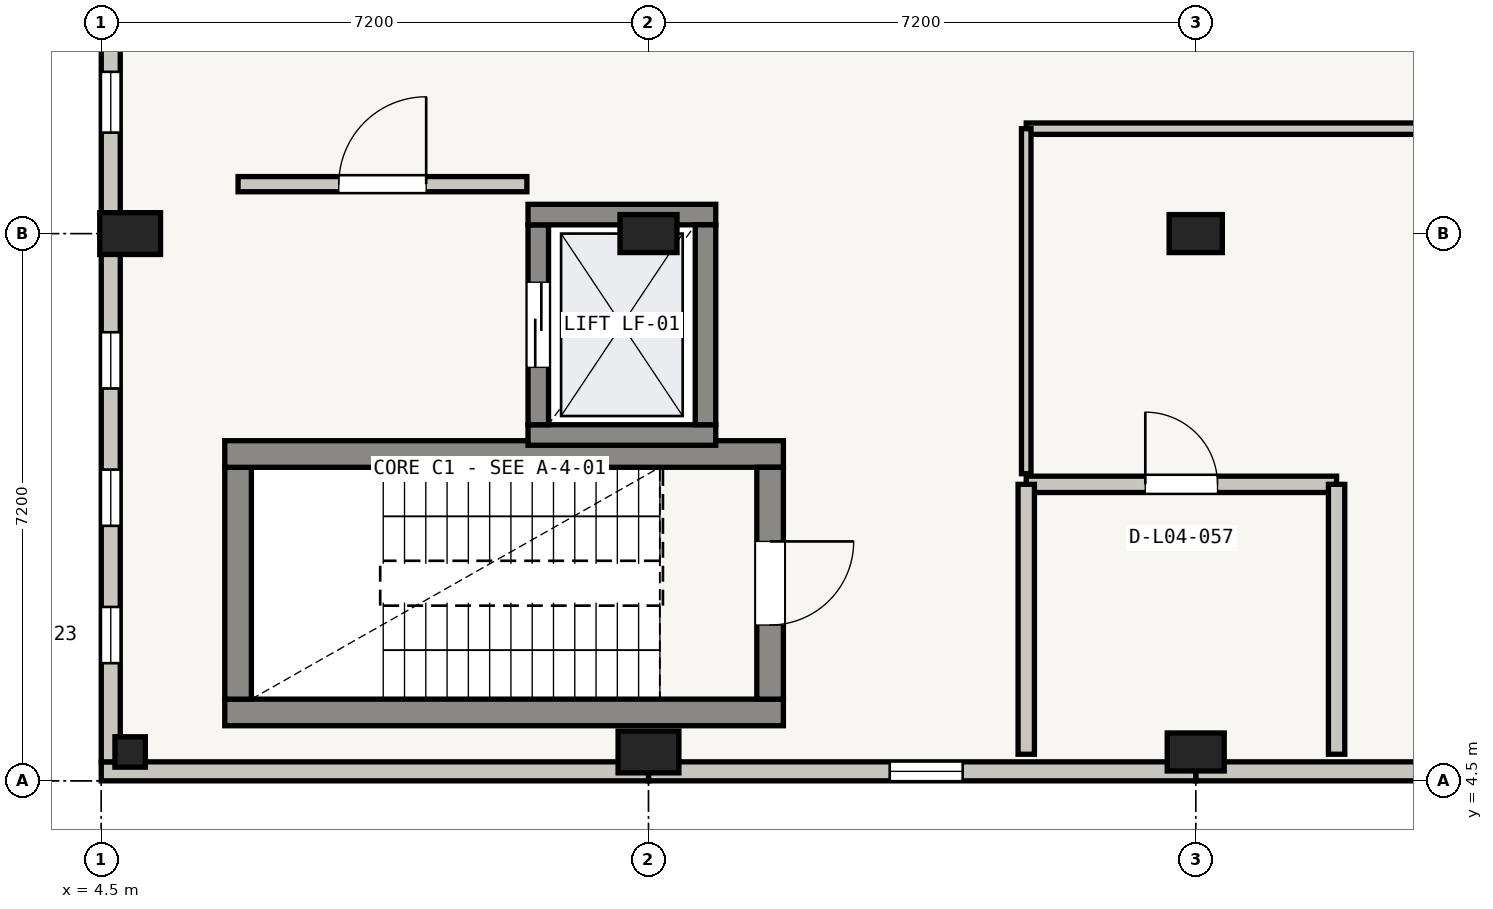
"""IFC4 building model, lengths in metres.
Left out: names, types, materials, properties, quantities, classifications, styles, units other than length and angle.
Written with IfcOpenShell. Run it as: python <this file> out.ifc"""

import sys

from ifc_helpers import new_model, si_unit, direction, frame, frame_2d, origin, origin_2d, place, context, subcontext, project, spatial, rectangle, extrude, element, fill, save


model = new_model("IFC4")
c1 = context("Model", 3, precision=1e-05, world=origin(), true_north=direction((0.0, 1.0)))
c2 = subcontext(c1, "Body", "Model", "MODEL_VIEW")
j1 = project(units=[si_unit("LENGTHUNIT", "METRE"), si_unit("PLANEANGLEUNIT", "RADIAN")], contexts=[c1])
p1 = place(None, origin())
s1 = spatial("IfcSite", under=j1, at=p1, CompositionType="ELEMENT")
p2 = place(p1, origin())
s2 = spatial("IfcBuilding", under=s1, at=p2, CompositionType="ELEMENT")
p3 = place(p2, frame((0.0, 0.0, 17.1)))
s3 = spatial("IfcBuildingStorey", under=s2, at=p3, CompositionType="ELEMENT", Elevation=17.1)
p4 = place(p3, frame((4.88, 4.88, 0.0), z_axis=(0.0, 0.0, 1.0), x_axis=(1.0, 0.0, 0.0)))
e1 = element("IfcColumn", 1, at=p4, inside=s3, PredefinedType="COLUMN", context=c2, shape_type="SweptSolid", body=[
    extrude(rectangle(XDim=0.4, YDim=0.4, at=origin_2d()), origin(), (0.0, 0.0, 1.0), 3.77),
])
for number, where, z_axis, x_axis in (
    (2, (4.88, 11.7, 0.0), (0.0, 0.0, 1.0), (1.0, 0.0, 0.0)),
    (3, (11.7, 4.88, 0.0), (0.0, 0.0, 1.0), (1.0, 0.0, 0.0)),
):
    element("IfcColumn", number, at=place(p3, frame(where, z_axis=z_axis, x_axis=x_axis)), inside=s3, PredefinedType="COLUMN", context=c2, shape_type="SweptSolid", body=[
        extrude(rectangle(XDim=0.8, YDim=0.55, at=origin_2d()), origin(), (0.0, 0.0, 1.0), 3.77),
    ])
for number, where, z_axis, x_axis in (
    (4, (11.7, 11.7, 0.0), (0.0, 0.0, 1.0), (1.0, 0.0, 0.0)),
    (5, (18.9, 4.88, 0.0), (0.0, 0.0, 1.0), (1.0, 0.0, 0.0)),
):
    element("IfcColumn", number, at=place(p3, frame(where, z_axis=z_axis, x_axis=x_axis)), inside=s3, PredefinedType="COLUMN", context=c2, shape_type="SweptSolid", body=[
        extrude(rectangle(XDim=0.75, YDim=0.5, at=origin_2d()), origin(), (0.0, 0.0, 1.0), 3.77),
    ])
p5 = place(p3, frame((18.9, 11.7, 0.0), z_axis=(0.0, 0.0, 1.0), x_axis=(1.0, 0.0, 0.0)))
e6 = element("IfcColumn", 6, at=p5, inside=s3, PredefinedType="COLUMN", context=c2, shape_type="SweptSolid", body=[
    extrude(rectangle(XDim=0.7, YDim=0.5, at=origin_2d()), origin(), (0.0, 0.0, 1.0), 3.77),
])
p6 = place(p3, frame((26.1, 4.625, 0.0), z_axis=(0.0, 0.0, 1.0), x_axis=(-1.0, 0.0, 0.0)))
e7 = element("IfcWall", 7, at=p6, inside=s3, PredefinedType="STANDARD", context=c2, shape_type="SweptSolid", body=[
    extrude(rectangle(XDim=7.2, YDim=0.25, at=frame_2d((3.6, 0.0))), origin(), (0.0, 0.0, 1.0), 2.805),
])
p7 = place(p6, frame((1.288, 0.0, 0.6)))
e8 = element("IfcOpeningElement", 8, at=p7, cuts=e7, PredefinedType="OPENING", context=c2, shape_type="SweptSolid", body=[
    extrude(rectangle(XDim=0.88, YDim=1.8, at=frame_2d((0.44, 0.9))), frame((0.0, 0.125, 0.0), z_axis=(0.0, -1.0, 0.0), x_axis=(1.0, 0.0, 0.0)), (0.0, 0.0, 1.0), 0.25),
])
p8 = place(p6, frame((3.16, 0.0, 0.6)))
e9 = element("IfcOpeningElement", 9, at=p8, cuts=e7, PredefinedType="OPENING", context=c2, shape_type="SweptSolid", body=[
    extrude(rectangle(XDim=0.88, YDim=1.8, at=frame_2d((0.44, 0.9))), frame((0.0, 0.125, 0.0), z_axis=(0.0, -1.0, 0.0), x_axis=(1.0, 0.0, 0.0)), (0.0, 0.0, 1.0), 0.25),
])
p9 = place(p3, frame((18.9, 4.625, 0.0), z_axis=(0.0, 0.0, 1.0), x_axis=(-1.0, 0.0, 0.0)))
e10 = element("IfcWall", 10, at=p9, inside=s3, PredefinedType="STANDARD", context=c2, shape_type="SweptSolid", body=[
    extrude(rectangle(XDim=7.2, YDim=0.25, at=frame_2d((3.6, 0.0))), origin(), (0.0, 0.0, 1.0), 3.155),
])
p10 = place(p9, frame((3.066, 0.0, 0.55)))
e11 = element("IfcOpeningElement", 11, at=p10, cuts=e10, PredefinedType="OPENING", context=c2, shape_type="SweptSolid", body=[
    extrude(rectangle(XDim=0.96, YDim=2.1, at=frame_2d((0.48, 1.05))), frame((0.0, 0.125, 0.0), z_axis=(0.0, -1.0, 0.0), x_axis=(1.0, 0.0, 0.0)), (0.0, 0.0, 1.0), 0.25),
])
p11 = place(p3, frame((11.7, 4.625, 0.0), z_axis=(0.0, 0.0, 1.0), x_axis=(-1.0, 0.0, 0.0)))
e12 = element("IfcWall", 12, at=p11, inside=s3, PredefinedType="STANDARD", context=c2, shape_type="SweptSolid", body=[
    extrude(rectangle(XDim=7.2, YDim=0.25, at=frame_2d((3.6, 0.0))), origin(), (0.0, 0.0, 1.0), 3.175),
])
p12 = place(p3, frame((4.625, 4.75, 0.0), z_axis=(0.0, 0.0, 1.0), x_axis=(0.0, 1.0, 0.0)))
e13 = element("IfcWall", 13, at=p12, inside=s3, PredefinedType="STANDARD", context=c2, shape_type="SweptSolid", body=[
    extrude(rectangle(XDim=6.95, YDim=0.25, at=frame_2d((3.475, 0.0))), origin(), (0.0, 0.0, 1.0), 3.175),
])
p13 = place(p12, frame((1.298, 0.0, 0.55)))
e14 = element("IfcOpeningElement", 14, at=p13, cuts=e13, PredefinedType="OPENING", context=c2, shape_type="SweptSolid", body=[
    extrude(rectangle(XDim=0.74, YDim=2.04, at=frame_2d((0.37, 1.02))), frame((0.0, 0.125, 0.0), z_axis=(0.0, -1.0, 0.0), x_axis=(1.0, 0.0, 0.0)), (0.0, 0.0, 1.0), 0.25),
])
p14 = place(p12, frame((3.105, 0.0, 0.55)))
e15 = element("IfcOpeningElement", 15, at=p14, cuts=e13, PredefinedType="OPENING", context=c2, shape_type="SweptSolid", body=[
    extrude(rectangle(XDim=0.74, YDim=2.04, at=frame_2d((0.37, 1.02))), frame((0.0, 0.125, 0.0), z_axis=(0.0, -1.0, 0.0), x_axis=(1.0, 0.0, 0.0)), (0.0, 0.0, 1.0), 0.25),
])
p15 = place(p12, frame((4.912, 0.0, 0.55)))
e16 = element("IfcOpeningElement", 16, at=p15, cuts=e13, PredefinedType="OPENING", context=c2, shape_type="SweptSolid", body=[
    extrude(rectangle(XDim=0.74, YDim=2.04, at=frame_2d((0.37, 1.02))), frame((0.0, 0.125, 0.0), z_axis=(0.0, -1.0, 0.0), x_axis=(1.0, 0.0, 0.0)), (0.0, 0.0, 1.0), 0.25),
])
p16 = place(p3, frame((4.625, 11.7, 0.0), z_axis=(0.0, 0.0, 1.0), x_axis=(0.0, 1.0, 0.0)))
e17 = element("IfcWall", 17, at=p16, inside=s3, PredefinedType="STANDARD", context=c2, shape_type="SweptSolid", body=[
    extrude(rectangle(XDim=7.2, YDim=0.25, at=frame_2d((3.6, 0.0))), origin(), (0.0, 0.0, 1.0), 3.175),
])
p17 = place(p16, frame((1.328, 0.0, 0.55)))
e18 = element("IfcOpeningElement", 18, at=p17, cuts=e17, PredefinedType="OPENING", context=c2, shape_type="SweptSolid", body=[
    extrude(rectangle(XDim=0.8, YDim=2.04, at=frame_2d((0.4, 1.02))), frame((0.0, 0.125, 0.0), z_axis=(0.0, -1.0, 0.0), x_axis=(1.0, 0.0, 0.0)), (0.0, 0.0, 1.0), 0.25),
])
p18 = place(p16, frame((2.45, 0.0, 0.55)))
e19 = element("IfcOpeningElement", 19, at=p18, cuts=e17, PredefinedType="OPENING", context=c2, shape_type="SweptSolid", body=[
    extrude(rectangle(XDim=0.8, YDim=2.04, at=frame_2d((0.4, 1.02))), frame((0.0, 0.125, 0.0), z_axis=(0.0, -1.0, 0.0), x_axis=(1.0, 0.0, 0.0)), (0.0, 0.0, 1.0), 0.25),
])
p19 = place(p3, frame((13.475, 5.4, 0.0), z_axis=(0.0, 0.0, 1.0), x_axis=(-1.0, 0.0, 0.0)))
e20 = element("IfcWall", 20, at=p19, inside=s3, PredefinedType="SHEAR", context=c2, shape_type="SweptSolid", body=[
    extrude(rectangle(XDim=7.35, YDim=0.35, at=frame_2d((3.675, 0.0))), origin(), (0.0, 0.0, 1.0), 3.77),
])
p20 = place(p3, frame((6.3, 5.575, 0.0), z_axis=(0.0, 0.0, 1.0), x_axis=(0.0, 1.0, 0.0)))
e21 = element("IfcWall", 21, at=p20, inside=s3, PredefinedType="SHEAR", context=c2, shape_type="SweptSolid", body=[
    extrude(rectangle(XDim=3.05, YDim=0.35, at=frame_2d((1.525, 0.0))), origin(), (0.0, 0.0, 1.0), 3.77),
])
p21 = place(p3, frame((6.125, 8.8, 0.0), z_axis=(0.0, 0.0, 1.0), x_axis=(1.0, 0.0, 0.0)))
e22 = element("IfcWall", 22, at=p21, inside=s3, PredefinedType="SHEAR", context=c2, shape_type="SweptSolid", body=[
    extrude(rectangle(XDim=7.35, YDim=0.35, at=frame_2d((3.675, 0.0))), origin(), (0.0, 0.0, 1.0), 3.77),
])
p22 = place(p3, frame((13.3, 8.625, 0.0), z_axis=(0.0, 0.0, 1.0), x_axis=(0.0, -1.0, 0.0)))
e23 = element("IfcWall", 23, at=p22, inside=s3, PredefinedType="SHEAR", context=c2, shape_type="SweptSolid", body=[
    extrude(rectangle(XDim=3.05, YDim=0.35, at=frame_2d((1.525, 0.0))), origin(), (0.0, 0.0, 1.0), 3.77),
])
p23 = place(p22, frame((0.975, 0.0, 0.0)))
e24 = element("IfcOpeningElement", 24, at=p23, cuts=e23, PredefinedType="OPENING", context=c2, shape_type="SweptSolid", body=[
    extrude(rectangle(XDim=1.1, YDim=2.05, at=frame_2d((0.55, 1.025))), frame((0.0, 0.175, 0.0), z_axis=(0.0, -1.0, 0.0), x_axis=(1.0, 0.0, 0.0)), (0.0, 0.0, 1.0), 0.35),
])
p24 = place(p3, frame((12.585, 9.05, 0.0), z_axis=(0.0, 0.0, 1.0), x_axis=(-1.0, 0.0, 0.0)))
e25 = element("IfcWall", 25, at=p24, inside=s3, PredefinedType="SHEAR", context=c2, shape_type="SweptSolid", body=[
    extrude(rectangle(XDim=2.47, YDim=0.27, at=frame_2d((1.235, 0.0))), origin(), (0.0, 0.0, 1.0), 3.77),
])
p25 = place(p3, frame((10.25, 9.185, 0.0), z_axis=(0.0, 0.0, 1.0), x_axis=(0.0, 1.0, 0.0)))
e26 = element("IfcWall", 26, at=p25, inside=s3, PredefinedType="SHEAR", context=c2, shape_type="SweptSolid", body=[
    extrude(rectangle(XDim=2.63, YDim=0.27, at=frame_2d((1.315, 0.0))), origin(), (0.0, 0.0, 1.0), 3.77),
])
p26 = place(p25, frame((0.755, 0.0, 0.0)))
e27 = element("IfcOpeningElement", 27, at=p26, cuts=e26, PredefinedType="OPENING", context=c2, shape_type="SweptSolid", body=[
    extrude(rectangle(XDim=1.12, YDim=2.1, at=frame_2d((0.56, 1.05))), frame((0.0, 0.135, 0.0), z_axis=(0.0, -1.0, 0.0), x_axis=(1.0, 0.0, 0.0)), (0.0, 0.0, 1.0), 0.27),
])
p27 = place(p3, frame((10.115, 11.95, 0.0), z_axis=(0.0, 0.0, 1.0), x_axis=(1.0, 0.0, 0.0)))
e28 = element("IfcWall", 28, at=p27, inside=s3, PredefinedType="SHEAR", context=c2, shape_type="SweptSolid", body=[
    extrude(rectangle(XDim=2.47, YDim=0.27, at=frame_2d((1.235, 0.0))), origin(), (0.0, 0.0, 1.0), 3.77),
])
p28 = place(p3, frame((12.45, 11.815, 0.0), z_axis=(0.0, 0.0, 1.0), x_axis=(0.0, -1.0, 0.0)))
e29 = element("IfcWall", 29, at=p28, inside=s3, PredefinedType="SHEAR", context=c2, shape_type="SweptSolid", body=[
    extrude(rectangle(XDim=2.63, YDim=0.27, at=frame_2d((1.315, 0.0))), origin(), (0.0, 0.0, 1.0), 3.77),
])
p29 = place(p3, frame((6.3, 12.35, 0.0), z_axis=(0.0, 0.0, 1.0), x_axis=(1.0, 0.0, 0.0)))
e30 = element("IfcWall", 30, at=p29, inside=s3, PredefinedType="SOLIDWALL", context=c2, shape_type="SweptSolid", body=[
    extrude(rectangle(XDim=3.8, YDim=0.2, at=frame_2d((1.9, 0.0))), origin(), (0.0, 0.0, 1.0), 2.79),
])
p30 = place(p29, frame((1.325, 0.0, 0.0)))
e31 = element("IfcOpeningElement", 31, at=p30, cuts=e30, PredefinedType="OPENING", context=c2, shape_type="SweptSolid", body=[
    extrude(rectangle(XDim=1.15, YDim=2.05, at=frame_2d((0.575, 1.025))), frame((0.0, 0.1, 0.0), z_axis=(0.0, -1.0, 0.0), x_axis=(1.0, 0.0, 0.0)), (0.0, 0.0, 1.0), 0.2),
])
p31 = place(p3, frame((16.67, 8.401, 0.0), z_axis=(0.0, 0.0, 1.0), x_axis=(1.0, 0.0, 0.0)))
e32 = element("IfcWall", 32, at=p31, inside=s3, PredefinedType="PLUMBINGWALL", context=c2, shape_type="SweptSolid", body=[
    extrude(rectangle(XDim=4.083, YDim=0.215, at=frame_2d((2.042, 0.0))), origin(), (0.0, 0.0, 1.0), 2.79),
])
p32 = place(p31, frame((1.567, 0.0, 0.0)))
e33 = element("IfcOpeningElement", 33, at=p32, cuts=e32, PredefinedType="OPENING", context=c2, shape_type="SweptSolid", body=[
    extrude(rectangle(XDim=0.95, YDim=2.05, at=frame_2d((0.475, 1.025))), frame((0.0, 0.107, 0.0), z_axis=(0.0, -1.0, 0.0), x_axis=(1.0, 0.0, 0.0)), (0.0, 0.0, 1.0), 0.215),
])
for number, where, z_axis, x_axis in (
    (34, (16.67, 4.85, 0.0), (0.0, 0.0, 1.0), (0.0, 1.0, 0.0)),
    (35, (20.753, 8.401, 0.0), (0.0, 0.0, 1.0), (0.0, -1.0, 0.0)),
):
    element("IfcWall", number, at=place(p3, frame(where, z_axis=z_axis, x_axis=x_axis)), inside=s3, PredefinedType="PLUMBINGWALL", context=c2, shape_type="SweptSolid", body=[
        extrude(rectangle(XDim=3.551, YDim=0.215, at=frame_2d((1.775, 0.0))), origin(), (0.0, 0.0, 1.0), 2.79),
    ])
p33 = place(p3, frame((16.67, 13.08, 0.0), z_axis=(0.0, 0.0, 1.0), x_axis=(1.0, 0.0, 0.0)))
e36 = element("IfcWall", 36, at=p33, inside=s3, PredefinedType="PARTITIONING", context=c2, shape_type="SweptSolid", body=[
    extrude(rectangle(XDim=16.38, YDim=0.15, at=frame_2d((8.19, 0.0))), origin(), (0.0, 0.0, 1.0), 2.79),
])
p34 = place(p33, frame((7.69, 0.0, 0.0)))
e37 = element("IfcOpeningElement", 37, at=p34, cuts=e36, PredefinedType="OPENING", context=c2, shape_type="SweptSolid", body=[
    extrude(rectangle(XDim=1.0, YDim=2.05, at=frame_2d((0.5, 1.025))), frame((0.0, 0.075, 0.0), z_axis=(0.0, -1.0, 0.0), x_axis=(1.0, 0.0, 0.0)), (0.0, 0.0, 1.0), 0.15),
])
p35 = place(p3, frame((16.67, 8.541, 0.0), z_axis=(0.0, 0.0, 1.0), x_axis=(0.0, 1.0, 0.0)))
e38 = element("IfcWall", 38, at=p35, inside=s3, PredefinedType="PARTITIONING", context=c2, shape_type="SweptSolid", body=[
    extrude(rectangle(XDim=4.539, YDim=0.125, at=frame_2d((2.27, 0.0))), origin(), (0.0, 0.0, 1.0), 2.79),
])
p36 = place(p10, origin())
e39 = element("IfcWindow", 39, at=p36, inside=s3, PartitioningType="DOUBLE_PANEL_VERTICAL", PredefinedType="WINDOW", context=c2, shape_type="SweptSolid", body=[
    extrude(rectangle(XDim=0.96, YDim=2.1, at=frame_2d((0.48, 1.05))), frame((0.0, 0.03, 0.0), z_axis=(0.0, -1.0, 0.0), x_axis=(1.0, 0.0, 0.0)), (0.0, 0.0, 1.0), 0.06),
])
fill(e11, e39)
p37 = place(p13, origin())
e40 = element("IfcWindow", 40, at=p37, inside=s3, PartitioningType="SINGLE_PANEL", PredefinedType="WINDOW", context=c2, shape_type="SweptSolid", body=[
    extrude(rectangle(XDim=0.74, YDim=2.04, at=frame_2d((0.37, 1.02))), frame((0.0, 0.03, 0.0), z_axis=(0.0, -1.0, 0.0), x_axis=(1.0, 0.0, 0.0)), (0.0, 0.0, 1.0), 0.06),
])
fill(e14, e40)
p38 = place(p14, origin())
e41 = element("IfcWindow", 41, at=p38, inside=s3, PartitioningType="SINGLE_PANEL", PredefinedType="WINDOW", context=c2, shape_type="SweptSolid", body=[
    extrude(rectangle(XDim=0.74, YDim=2.04, at=frame_2d((0.37, 1.02))), frame((0.0, 0.03, 0.0), z_axis=(0.0, -1.0, 0.0), x_axis=(1.0, 0.0, 0.0)), (0.0, 0.0, 1.0), 0.06),
])
fill(e15, e41)
p39 = place(p15, origin())
e42 = element("IfcWindow", 42, at=p39, inside=s3, PartitioningType="SINGLE_PANEL", PredefinedType="WINDOW", context=c2, shape_type="SweptSolid", body=[
    extrude(rectangle(XDim=0.74, YDim=2.04, at=frame_2d((0.37, 1.02))), frame((0.0, 0.03, 0.0), z_axis=(0.0, -1.0, 0.0), x_axis=(1.0, 0.0, 0.0)), (0.0, 0.0, 1.0), 0.06),
])
fill(e16, e42)
p40 = place(p17, origin())
e43 = element("IfcWindow", 43, at=p40, inside=s3, PartitioningType="SINGLE_PANEL", PredefinedType="WINDOW", context=c2, shape_type="SweptSolid", body=[
    extrude(rectangle(XDim=0.8, YDim=2.04, at=frame_2d((0.4, 1.02))), frame((0.0, 0.03, 0.0), z_axis=(0.0, -1.0, 0.0), x_axis=(1.0, 0.0, 0.0)), (0.0, 0.0, 1.0), 0.06),
])
fill(e18, e43)
p41 = place(p23, origin())
e44 = element("IfcDoor", 44, at=p41, inside=s3, OperationType="SINGLE_SWING_LEFT", PredefinedType="DOOR", context=c2, shape_type="SweptSolid", body=[
    extrude(rectangle(XDim=1.1, YDim=2.05, at=frame_2d((0.55, 1.025))), frame((0.0, 0.025, 0.0), z_axis=(0.0, -1.0, 0.0), x_axis=(1.0, 0.0, 0.0)), (0.0, 0.0, 1.0), 0.05),
])
fill(e24, e44)
p42 = place(p26, origin())
e45 = element("IfcDoor", 45, at=p42, inside=s3, OperationType="DOUBLE_DOOR_SLIDING", PredefinedType="DOOR", context=c2, shape_type="SweptSolid", body=[
    extrude(rectangle(XDim=1.12, YDim=2.1, at=frame_2d((0.56, 1.05))), frame((0.0, 0.025, 0.0), z_axis=(0.0, -1.0, 0.0), x_axis=(1.0, 0.0, 0.0)), (0.0, 0.0, 1.0), 0.05),
])
fill(e27, e45)
p43 = place(p30, origin())
e46 = element("IfcDoor", 46, at=p43, inside=s3, OperationType="SINGLE_SWING_RIGHT", PredefinedType="DOOR", context=c2, shape_type="SweptSolid", body=[
    extrude(rectangle(XDim=1.15, YDim=2.05, at=frame_2d((0.575, 1.025))), frame((0.0, 0.025, 0.0), z_axis=(0.0, -1.0, 0.0), x_axis=(1.0, 0.0, 0.0)), (0.0, 0.0, 1.0), 0.05),
])
fill(e31, e46)
p44 = place(p32, origin())
e47 = element("IfcDoor", 47, at=p44, inside=s3, OperationType="SINGLE_SWING_LEFT", PredefinedType="DOOR", context=c2, shape_type="SweptSolid", body=[
    extrude(rectangle(XDim=0.95, YDim=2.05, at=frame_2d((0.475, 1.025))), frame((0.0, 0.025, 0.0), z_axis=(0.0, -1.0, 0.0), x_axis=(1.0, 0.0, 0.0)), (0.0, 0.0, 1.0), 0.05),
])
fill(e33, e47)
save(model, sys.argv[1])
